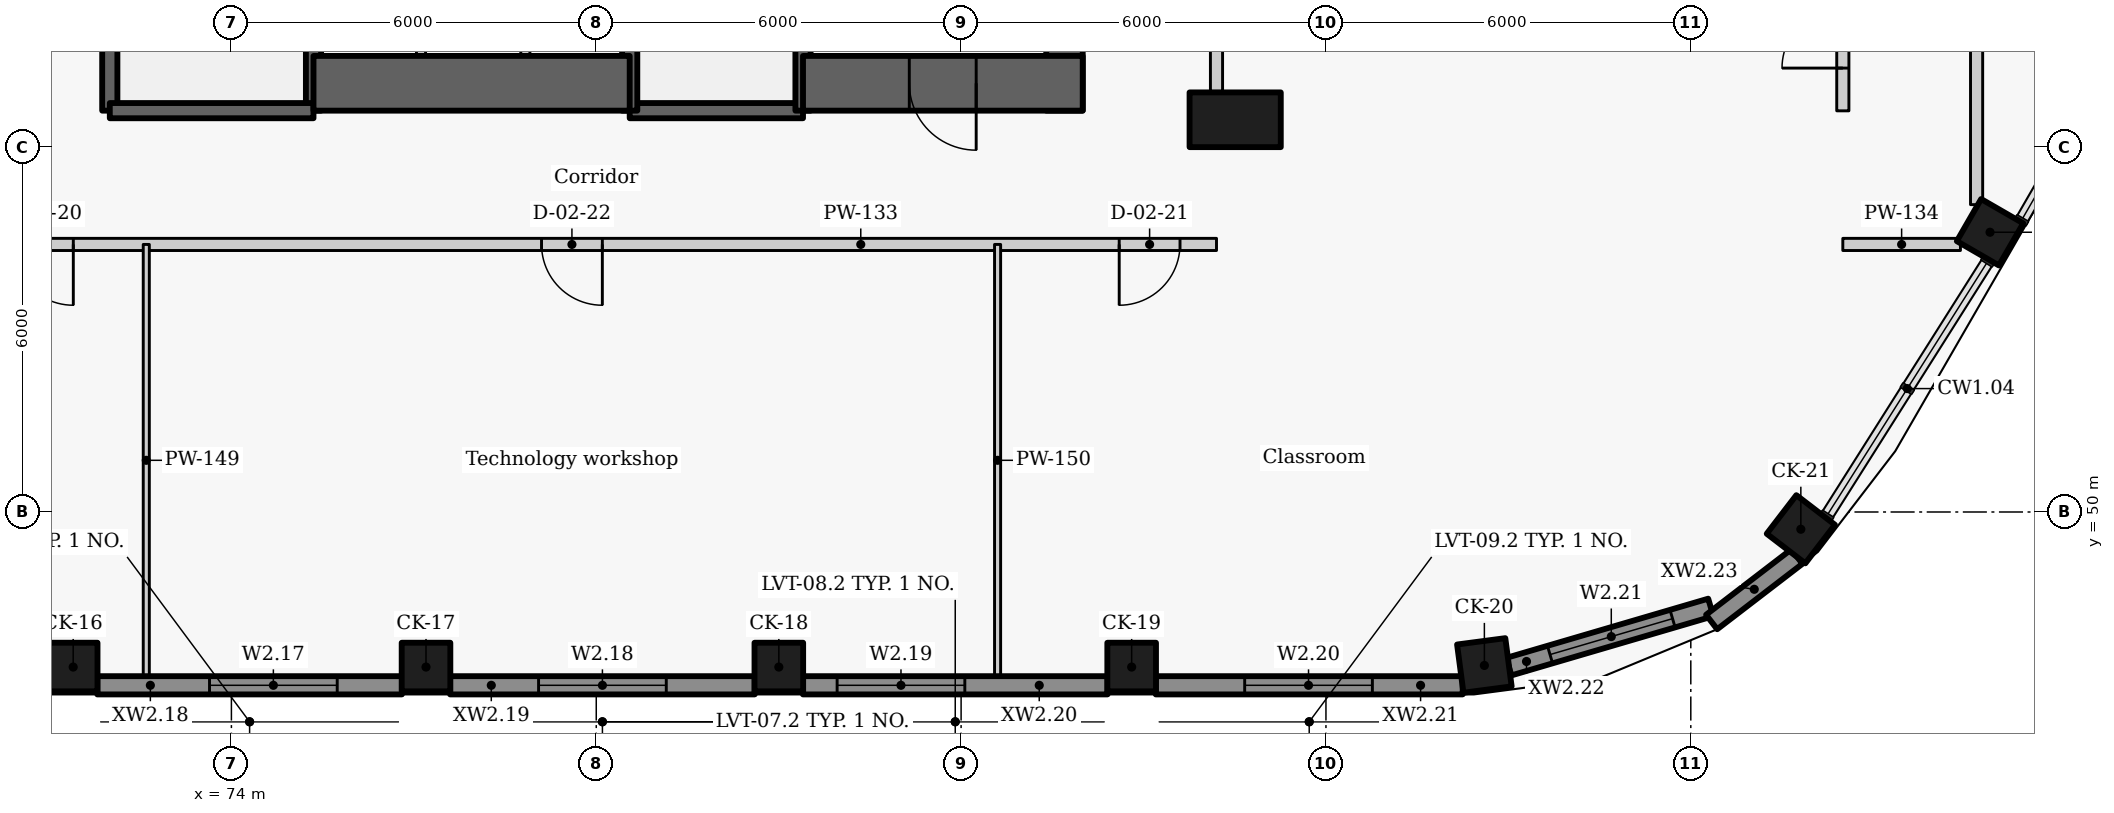
"""IFC4 building model, lengths in metres.
Left out: names, types, materials, properties, quantities, classifications, styles, units other than length and angle.
Written with IfcOpenShell. Run it as: python <this file> out.ifc"""

import sys

from ifc_helpers import new_model, si_unit, direction, frame, frame_2d, origin, origin_2d, place, context, subcontext, project, spatial, rectangle, extrude, element, fill, save


model = new_model("IFC4")
c1 = context("Model", 3, precision=1e-05, world=origin(), true_north=direction((0.0, 1.0)))
c2 = subcontext(c1, "Body", "Model", "MODEL_VIEW")
j1 = project(units=[si_unit("LENGTHUNIT", "METRE"), si_unit("PLANEANGLEUNIT", "RADIAN")], contexts=[c1])
p1 = place(None, origin())
s1 = spatial("IfcSite", under=j1, at=p1, CompositionType="ELEMENT")
p2 = place(p1, origin())
s2 = spatial("IfcBuilding", under=s1, at=p2, CompositionType="ELEMENT")
p3 = place(p2, frame((0.0, 0.0, 15.6)))
s3 = spatial("IfcBuildingStorey", under=s2, at=p3, CompositionType="ELEMENT", Elevation=15.6)
p4 = place(p3, frame((90.507, 56.45, 0.0), z_axis=(0.0, 0.0, 1.0), x_axis=(1.0, 0.0, 0.0)))
e1 = element("IfcColumn", 1, at=p4, inside=s3, PredefinedType="COLUMN", context=c2, shape_type="SweptSolid", body=[
    extrude(rectangle(XDim=1.5, YDim=0.9, at=origin_2d()), origin(), (0.0, 0.0, 1.0), 4.2),
])
for number, where, z_axis, x_axis in (
    (2, (71.398, 47.45, 0.0), (0.0, 0.0, 1.0), (1.0, 0.0, 0.0)),
    (3, (77.2, 47.45, 0.0), (0.0, 0.0, 1.0), (1.0, 0.0, 0.0)),
    (4, (83.002, 47.45, 0.0), (0.0, 0.0, 1.0), (1.0, 0.0, 0.0)),
    (5, (88.805, 47.45, 0.0), (0.0, 0.0, 1.0), (1.0, 0.0, 0.0)),
    (6, (94.605, 47.477, 0.0), (0.0, 0.0, 1.0), (0.991, 0.131, 0.0)),
    (7, (99.81, 49.716, 0.0), (0.0, 0.0, 1.0), (0.609, 0.793, 0.0)),
    (8, (102.921, 54.6, 0.0), (0.0, 0.0, 1.0), (0.5, 0.866, 0.0)),
):
    element("IfcColumn", number, at=place(p3, frame(where, z_axis=z_axis, x_axis=x_axis)), inside=s3, PredefinedType="COLUMN", context=c2, shape_type="SweptSolid", body=[
        extrude(rectangle(XDim=0.8, YDim=0.8, at=origin_2d()), origin(), (0.0, 0.0, 1.0), 4.2),
    ])
p5 = place(p3, frame((71.794, 47.15, 0.0), z_axis=(0.0, 0.0, 1.0), x_axis=(1.0, 0.0, 0.0)))
e9 = element("IfcWall", 9, at=p5, inside=s3, PredefinedType="SOLIDWALL", context=c2, shape_type="SweptSolid", body=[
    extrude(rectangle(XDim=5.01, YDim=0.3, at=frame_2d((2.505, 0.0))), origin(), (0.0, 0.0, 1.0), 3.0),
])
p6 = place(p5, frame((1.846, 0.0, 0.9)))
e10 = element("IfcOpeningElement", 10, at=p6, cuts=e9, PredefinedType="OPENING", context=c2, shape_type="SweptSolid", body=[
    extrude(rectangle(XDim=2.1, YDim=2.05, at=frame_2d((1.05, 1.025))), frame((0.0, 0.16, 0.0), z_axis=(0.0, -1.0, 0.0), x_axis=(1.0, 0.0, 0.0)), (0.0, 0.0, 1.0), 0.32),
])
p7 = place(p3, frame((77.596, 47.15, 0.0), z_axis=(0.0, 0.0, 1.0), x_axis=(1.0, 0.0, 0.0)))
e11 = element("IfcWall", 11, at=p7, inside=s3, PredefinedType="SOLIDWALL", context=c2, shape_type="SweptSolid", body=[
    extrude(rectangle(XDim=5.01, YDim=0.3, at=frame_2d((2.505, 0.0))), origin(), (0.0, 0.0, 1.0), 3.0),
])
p8 = place(p7, frame((1.455, 0.0, 0.9)))
e12 = element("IfcOpeningElement", 12, at=p8, cuts=e11, PredefinedType="OPENING", context=c2, shape_type="SweptSolid", body=[
    extrude(rectangle(XDim=2.1, YDim=2.05, at=frame_2d((1.05, 1.025))), frame((0.0, 0.16, 0.0), z_axis=(0.0, -1.0, 0.0), x_axis=(1.0, 0.0, 0.0)), (0.0, 0.0, 1.0), 0.32),
])
p9 = place(p3, frame((83.398, 47.15, 0.0), z_axis=(0.0, 0.0, 1.0), x_axis=(1.0, 0.0, 0.0)))
e13 = element("IfcWall", 13, at=p9, inside=s3, PredefinedType="SOLIDWALL", context=c2, shape_type="SweptSolid", body=[
    extrude(rectangle(XDim=5.01, YDim=0.3, at=frame_2d((2.505, 0.0))), origin(), (0.0, 0.0, 1.0), 3.0),
])
p10 = place(p9, frame((0.563, 0.0, 0.9)))
e14 = element("IfcOpeningElement", 14, at=p10, cuts=e13, PredefinedType="OPENING", context=c2, shape_type="SweptSolid", body=[
    extrude(rectangle(XDim=2.1, YDim=2.05, at=frame_2d((1.05, 1.025))), frame((0.0, 0.16, 0.0), z_axis=(0.0, -1.0, 0.0), x_axis=(1.0, 0.0, 0.0)), (0.0, 0.0, 1.0), 0.32),
])
p11 = place(p3, frame((89.201, 47.15, 0.0), z_axis=(0.0, 0.0, 1.0), x_axis=(1.0, 0.0, 0.0)))
e15 = element("IfcWall", 15, at=p11, inside=s3, PredefinedType="SOLIDWALL", context=c2, shape_type="SweptSolid", body=[
    extrude(rectangle(XDim=5.048, YDim=0.3, at=frame_2d((2.524, 0.0))), origin(), (0.0, 0.0, 1.0), 3.0),
])
p12 = place(p11, frame((1.463, 0.0, 0.9)))
e16 = element("IfcOpeningElement", 16, at=p12, cuts=e15, PredefinedType="OPENING", context=c2, shape_type="SweptSolid", body=[
    extrude(rectangle(XDim=2.1, YDim=2.05, at=frame_2d((1.05, 1.025))), frame((0.0, 0.16, 0.0), z_axis=(0.0, -1.0, 0.0), x_axis=(1.0, 0.0, 0.0)), (0.0, 0.0, 1.0), 0.32),
])
p13 = place(p3, frame((95.007, 47.457, 0.0), z_axis=(0.0, 0.0, 1.0), x_axis=(0.959578633815, 0.281440660756, 0.0)))
e17 = element("IfcWall", 17, at=p13, inside=s3, PredefinedType="SOLIDWALL", context=c2, shape_type="SweptSolid", body=[
    extrude(rectangle(XDim=3.461, YDim=0.3, at=frame_2d((1.73, 0.0))), origin(), (0.0, 0.0, 1.0), 3.0),
])
p14 = place(p13, frame((0.706, 0.0, 0.9)))
e18 = element("IfcOpeningElement", 18, at=p14, cuts=e17, PredefinedType="OPENING", context=c2, shape_type="SweptSolid", body=[
    extrude(rectangle(XDim=2.1, YDim=2.05, at=frame_2d((1.05, 1.025))), frame((0.0, 0.16, 0.0), z_axis=(0.0, -1.0, 0.0), x_axis=(1.0, 0.0, 0.0)), (0.0, 0.0, 1.0), 0.32),
])
p15 = place(p3, frame((98.343, 48.191, 0.0), z_axis=(0.0, 0.0, 1.0), x_axis=(0.793403972369, 0.608695438318, 0.0)))
e19 = element("IfcWall", 19, at=p15, inside=s3, PredefinedType="SOLIDWALL", context=c2, shape_type="SweptSolid", body=[
    extrude(rectangle(XDim=1.767, YDim=0.3, at=frame_2d((0.884, 0.0))), origin(), (0.0, 0.0, 1.0), 3.0),
])
p16 = place(p3, frame((87.7, 72.2, -0.3), z_axis=(0.0, 0.0, 1.0), x_axis=(0.0, -1.0, 0.0)))
e20 = element("IfcWall", 20, at=p16, inside=s3, PredefinedType="SHEAR", context=c2, shape_type="SweptSolid", body=[
    extrude(rectangle(XDim=15.6, YDim=0.6, at=frame_2d((7.8, 0.0))), origin(), (0.0, 0.0, 1.0), 4.2),
])
p17 = place(p16, frame((11.8, 0.0, 0.3)))
e21 = element("IfcOpeningElement", 21, at=p17, cuts=e20, PredefinedType="OPENING", context=c2, shape_type="SweptSolid", body=[
    extrude(rectangle(XDim=1.1, YDim=2.1, at=frame_2d((0.55, 1.05))), frame((0.0, 0.31, 0.0), z_axis=(0.0, -1.0, 0.0), x_axis=(1.0, 0.0, 0.0)), (0.0, 0.0, 1.0), 0.62),
])
p18 = place(p3, frame((75.35, 56.6, -0.3), z_axis=(0.0, 0.0, 1.0), x_axis=(0.0, 1.0, 0.0)))
e22 = element("IfcWall", 22, at=p18, inside=s3, PredefinedType="SHEAR", context=c2, shape_type="SweptSolid", body=[
    extrude(rectangle(XDim=5.003, YDim=0.25, at=frame_2d((2.501, 0.0))), origin(), (0.0, 0.0, 1.0), 4.2),
])
p19 = place(p3, frame((72.0, 56.6, -0.3), z_axis=(0.0, 0.0, 1.0), x_axis=(0.0, 1.0, 0.0)))
e23 = element("IfcWall", 23, at=p19, inside=s3, PredefinedType="SHEAR", context=c2, shape_type="SweptSolid", body=[
    extrude(rectangle(XDim=6.5, YDim=0.25, at=frame_2d((3.25, 0.0))), origin(), (0.0, 0.0, 1.0), 4.2),
])
p20 = place(p3, frame((72.0, 56.6, -0.3), z_axis=(0.0, 0.0, 1.0), x_axis=(1.0, 0.0, 0.0)))
e24 = element("IfcWall", 24, at=p20, inside=s3, PredefinedType="SHEAR", context=c2, shape_type="SweptSolid", body=[
    extrude(rectangle(XDim=3.35, YDim=0.25, at=frame_2d((1.675, 0.0))), origin(), (0.0, 0.0, 1.0), 4.2),
])
p21 = place(p3, frame((80.55, 56.6, -0.3), z_axis=(0.0, 0.0, 1.0), x_axis=(1.0, 0.0, 0.0)))
e25 = element("IfcWall", 25, at=p21, inside=s3, PredefinedType="SHEAR", context=c2, shape_type="SweptSolid", body=[
    extrude(rectangle(XDim=2.85, YDim=0.25, at=frame_2d((1.425, 0.0))), origin(), (0.0, 0.0, 1.0), 4.2),
])
p22 = place(p3, frame((83.4, 63.1, -0.3), z_axis=(0.0, 0.0, 1.0), x_axis=(0.0, -1.0, 0.0)))
e26 = element("IfcWall", 26, at=p22, inside=s3, PredefinedType="SHEAR", context=c2, shape_type="SweptSolid", body=[
    extrude(rectangle(XDim=6.5, YDim=0.25, at=frame_2d((3.25, 0.0))), origin(), (0.0, 0.0, 1.0), 4.2),
])
p23 = place(p22, frame((0.25, 0.0, 0.3)))
e27 = element("IfcOpeningElement", 27, at=p23, cuts=e26, PredefinedType="OPENING", context=c2, shape_type="SweptSolid", body=[
    extrude(rectangle(XDim=0.9, YDim=2.1, at=frame_2d((0.45, 1.05))), frame((0.0, 0.135, 0.0), z_axis=(0.0, -1.0, 0.0), x_axis=(1.0, 0.0, 0.0)), (0.0, 0.0, 1.0), 0.27),
])
p24 = place(p3, frame((80.55, 56.6, -0.3), z_axis=(0.0, 0.0, 1.0), x_axis=(0.0, 1.0, 0.0)))
e28 = element("IfcWall", 28, at=p24, inside=s3, PredefinedType="SHEAR", context=c2, shape_type="SweptSolid", body=[
    extrude(rectangle(XDim=5.003, YDim=0.25, at=frame_2d((2.501, 0.0))), origin(), (0.0, 0.0, 1.0), 4.2),
])
p25 = place(p3, frame((75.35, 57.05, -0.3), z_axis=(0.0, 0.0, 1.0), x_axis=(1.0, 0.0, 0.0)))
e29 = element("IfcWall", 29, at=p25, inside=s3, PredefinedType="SHEAR", context=c2, shape_type="SweptSolid", body=[
    extrude(rectangle(XDim=5.2, YDim=0.9, at=frame_2d((2.6, 0.0))), origin(), (0.0, 0.0, 1.0), 4.2),
])
p26 = place(p3, frame((88.0, 57.05, -0.3), z_axis=(0.0, 0.0, 1.0), x_axis=(-1.0, 0.0, 0.0)))
e30 = element("IfcWall", 30, at=p26, inside=s3, PredefinedType="SHEAR", context=c2, shape_type="SweptSolid", body=[
    extrude(rectangle(XDim=4.6, YDim=0.9, at=frame_2d((2.3, 0.0))), origin(), (0.0, 0.0, 1.0), 4.2),
])
p27 = place(p26, frame((1.752, 0.0, 0.3)))
e31 = element("IfcOpeningElement", 31, at=p27, cuts=e30, PredefinedType="OPENING", context=c2, shape_type="SweptSolid", body=[
    extrude(rectangle(XDim=1.1, YDim=2.1, at=frame_2d((0.55, 1.05))), frame((0.0, 0.46, 0.0), z_axis=(0.0, -1.0, 0.0), x_axis=(1.0, 0.0, 0.0)), (0.0, 0.0, 1.0), 0.92),
])
for number, where, z_axis, x_axis in (
    (32, (77.118, 56.6, 0.0), (0.0, 0.0, 1.0), (0.0, 1.0, 0.0)),
    (33, (78.834, 56.6, 0.0), (0.0, 0.0, 1.0), (0.0, 1.0, 0.0)),
):
    element("IfcWall", number, at=place(p3, frame(where, z_axis=z_axis, x_axis=x_axis)), inside=s3, PredefinedType="PARTITIONING", context=c2, shape_type="SweptSolid", body=[
        extrude(rectangle(XDim=5.0, YDim=0.15, at=frame_2d((2.5, 0.0))), origin(), (0.0, 0.0, 1.0), 3.9),
    ])
p28 = place(p3, frame((102.7, 61.553, 0.0), z_axis=(0.0, 0.0, 1.0), x_axis=(0.0, -1.0, 0.0)))
e34 = element("IfcWall", 34, at=p28, inside=s3, PredefinedType="PARTITIONING", context=c2, shape_type="SweptSolid", body=[
    extrude(rectangle(XDim=6.499, YDim=0.2, at=frame_2d((3.249, 0.0))), origin(), (0.0, 0.0, 1.0), 3.9),
])
p29 = place(p28, frame((2.75, 0.0, 0.0)))
e35 = element("IfcOpeningElement", 35, at=p29, cuts=e34, PredefinedType="OPENING", context=c2, shape_type="SweptSolid", body=[
    extrude(rectangle(XDim=1.0, YDim=2.1, at=frame_2d((0.5, 1.05))), frame((0.0, 0.11, 0.0), z_axis=(0.0, -1.0, 0.0), x_axis=(1.0, 0.0, 0.0)), (0.0, 0.0, 1.0), 0.22),
])
p30 = place(p3, frame((100.5, 56.597, 0.0), z_axis=(0.0, 0.0, 1.0), x_axis=(0.0, 1.0, 0.0)))
e36 = element("IfcWall", 36, at=p30, inside=s3, PredefinedType="PARTITIONING", context=c2, shape_type="SweptSolid", body=[
    extrude(rectangle(XDim=10.873, YDim=0.2, at=frame_2d((5.437, 0.0))), origin(), (0.0, 0.0, 1.0), 3.9),
])
p31 = place(p30, frame((5.003, 0.0, 0.0)))
e37 = element("IfcOpeningElement", 37, at=p31, cuts=e36, PredefinedType="OPENING", context=c2, shape_type="SweptSolid", body=[
    extrude(rectangle(XDim=1.0, YDim=2.1, at=frame_2d((0.5, 1.05))), frame((0.0, 0.11, 0.0), z_axis=(0.0, -1.0, 0.0), x_axis=(1.0, 0.0, 0.0)), (0.0, 0.0, 1.0), 0.22),
])
p32 = place(p30, frame((0.703, 0.0, 0.0)))
e38 = element("IfcOpeningElement", 38, at=p32, cuts=e36, PredefinedType="OPENING", context=c2, shape_type="SweptSolid", body=[
    extrude(rectangle(XDim=1.0, YDim=2.1, at=frame_2d((0.5, 1.05))), frame((0.0, 0.11, 0.0), z_axis=(0.0, -1.0, 0.0), x_axis=(1.0, 0.0, 0.0)), (0.0, 0.0, 1.0), 0.22),
])
p33 = place(p3, frame((90.2, 56.917, 0.0), z_axis=(0.0, 0.0, 1.0), x_axis=(0.0, 1.0, 0.0)))
e39 = element("IfcWall", 39, at=p33, inside=s3, PredefinedType="PARTITIONING", context=c2, shape_type="SweptSolid", body=[
    extrude(rectangle(XDim=1.516, YDim=0.2, at=frame_2d((0.758, 0.0))), origin(), (0.0, 0.0, 1.0), 3.9),
])
p34 = place(p3, frame((90.2, 54.4, 0.0), z_axis=(0.0, 0.0, 1.0), x_axis=(-1.0, 0.0, 0.0)))
e40 = element("IfcWall", 40, at=p34, inside=s3, PredefinedType="PARTITIONING", context=c2, shape_type="SweptSolid", body=[
    extrude(rectangle(XDim=20.4, YDim=0.2, at=frame_2d((10.2, 0.0))), origin(), (0.0, 0.0, 1.0), 3.9),
])
p35 = place(p34, frame((18.8, 0.0, 0.0)))
e41 = element("IfcOpeningElement", 41, at=p35, cuts=e40, PredefinedType="OPENING", context=c2, shape_type="SweptSolid", body=[
    extrude(rectangle(XDim=1.0, YDim=2.1, at=frame_2d((0.5, 1.05))), frame((0.0, 0.11, 0.0), z_axis=(0.0, -1.0, 0.0), x_axis=(1.0, 0.0, 0.0)), (0.0, 0.0, 1.0), 0.22),
])
p36 = place(p34, frame((0.6, 0.0, 0.0)))
e42 = element("IfcOpeningElement", 42, at=p36, cuts=e40, PredefinedType="OPENING", context=c2, shape_type="SweptSolid", body=[
    extrude(rectangle(XDim=1.0, YDim=2.1, at=frame_2d((0.5, 1.05))), frame((0.0, 0.11, 0.0), z_axis=(0.0, -1.0, 0.0), x_axis=(1.0, 0.0, 0.0)), (0.0, 0.0, 1.0), 0.22),
])
p37 = place(p34, frame((10.1, 0.0, 0.0)))
e43 = element("IfcOpeningElement", 43, at=p37, cuts=e40, PredefinedType="OPENING", context=c2, shape_type="SweptSolid", body=[
    extrude(rectangle(XDim=1.0, YDim=2.1, at=frame_2d((0.5, 1.05))), frame((0.0, 0.11, 0.0), z_axis=(0.0, -1.0, 0.0), x_axis=(1.0, 0.0, 0.0)), (0.0, 0.0, 1.0), 0.22),
])
p38 = place(p3, frame((100.5, 54.4, 0.0), z_axis=(0.0, 0.0, 1.0), x_axis=(1.0, 0.0, 0.0)))
e44 = element("IfcWall", 44, at=p38, inside=s3, PredefinedType="PARTITIONING", context=c2, shape_type="SweptSolid", body=[
    extrude(rectangle(XDim=1.934, YDim=0.2, at=frame_2d((0.967, 0.0))), origin(), (0.0, 0.0, 1.0), 3.9),
])
for number, where, z_axis, x_axis in (
    (45, (72.6, 47.3, 0.0), (0.0, 0.0, 1.0), (0.0, 1.0, 0.0)),
    (46, (86.6, 47.3, 0.0), (0.0, 0.0, 1.0), (0.0, 1.0, 0.0)),
):
    element("IfcWall", number, at=place(p3, frame(where, z_axis=z_axis, x_axis=x_axis)), inside=s3, PredefinedType="PARTITIONING", context=c2, shape_type="SweptSolid", body=[
        extrude(rectangle(XDim=7.1, YDim=0.1, at=frame_2d((3.55, 0.0))), origin(), (0.0, 0.0, 1.0), 3.13),
    ])
p39 = place(p6, origin())
e47 = element("IfcWindow", 47, at=p39, inside=s3, PartitioningType="SINGLE_PANEL", PredefinedType="WINDOW", context=c2, shape_type="SweptSolid", body=[
    extrude(rectangle(XDim=2.1, YDim=2.05, at=frame_2d((1.05, 1.025))), frame((0.0, 0.03, 0.0), z_axis=(0.0, -1.0, 0.0), x_axis=(1.0, 0.0, 0.0)), (0.0, 0.0, 1.0), 0.06),
])
fill(e10, e47)
p40 = place(p8, origin())
e48 = element("IfcWindow", 48, at=p40, inside=s3, PartitioningType="SINGLE_PANEL", PredefinedType="WINDOW", context=c2, shape_type="SweptSolid", body=[
    extrude(rectangle(XDim=2.1, YDim=2.05, at=frame_2d((1.05, 1.025))), frame((0.0, 0.03, 0.0), z_axis=(0.0, -1.0, 0.0), x_axis=(1.0, 0.0, 0.0)), (0.0, 0.0, 1.0), 0.06),
])
fill(e12, e48)
p41 = place(p10, origin())
e49 = element("IfcWindow", 49, at=p41, inside=s3, PartitioningType="SINGLE_PANEL", PredefinedType="WINDOW", context=c2, shape_type="SweptSolid", body=[
    extrude(rectangle(XDim=2.1, YDim=2.05, at=frame_2d((1.05, 1.025))), frame((0.0, 0.03, 0.0), z_axis=(0.0, -1.0, 0.0), x_axis=(1.0, 0.0, 0.0)), (0.0, 0.0, 1.0), 0.06),
])
fill(e14, e49)
p42 = place(p12, origin())
e50 = element("IfcWindow", 50, at=p42, inside=s3, PartitioningType="SINGLE_PANEL", PredefinedType="WINDOW", context=c2, shape_type="SweptSolid", body=[
    extrude(rectangle(XDim=2.1, YDim=2.05, at=frame_2d((1.05, 1.025))), frame((0.0, 0.03, 0.0), z_axis=(0.0, -1.0, 0.0), x_axis=(1.0, 0.0, 0.0)), (0.0, 0.0, 1.0), 0.06),
])
fill(e16, e50)
p43 = place(p14, origin())
e51 = element("IfcWindow", 51, at=p43, inside=s3, PartitioningType="SINGLE_PANEL", PredefinedType="WINDOW", context=c2, shape_type="SweptSolid", body=[
    extrude(rectangle(XDim=2.1, YDim=2.05, at=frame_2d((1.05, 1.025))), frame((0.0, 0.03, 0.0), z_axis=(0.0, -1.0, 0.0), x_axis=(1.0, 0.0, 0.0)), (0.0, 0.0, 1.0), 0.06),
])
fill(e18, e51)
p44 = place(p32, origin())
e52 = element("IfcDoor", 52, at=p44, inside=s3, OperationType="SINGLE_SWING_LEFT", PredefinedType="DOOR", context=c2, shape_type="SweptSolid", body=[
    extrude(rectangle(XDim=1.0, YDim=2.1, at=frame_2d((0.5, 1.05))), frame((0.0, 0.025, 0.0), z_axis=(0.0, -1.0, 0.0), x_axis=(1.0, 0.0, 0.0)), (0.0, 0.0, 1.0), 0.05),
])
fill(e38, e52)
p45 = place(p35, origin())
e53 = element("IfcDoor", 53, at=p45, inside=s3, OperationType="SINGLE_SWING_LEFT", PredefinedType="DOOR", context=c2, shape_type="SweptSolid", body=[
    extrude(rectangle(XDim=1.0, YDim=2.1, at=frame_2d((0.5, 1.05))), frame((0.0, 0.025, 0.0), z_axis=(0.0, -1.0, 0.0), x_axis=(1.0, 0.0, 0.0)), (0.0, 0.0, 1.0), 0.05),
])
fill(e41, e53)
p46 = place(p36, origin())
e54 = element("IfcDoor", 54, at=p46, inside=s3, OperationType="SINGLE_SWING_RIGHT", PredefinedType="DOOR", context=c2, shape_type="SweptSolid", body=[
    extrude(rectangle(XDim=1.0, YDim=2.1, at=frame_2d((0.5, 1.05))), frame((0.0, 0.025, 0.0), z_axis=(0.0, -1.0, 0.0), x_axis=(1.0, 0.0, 0.0)), (0.0, 0.0, 1.0), 0.05),
])
fill(e42, e54)
p47 = place(p37, origin())
e55 = element("IfcDoor", 55, at=p47, inside=s3, OperationType="SINGLE_SWING_LEFT", PredefinedType="DOOR", context=c2, shape_type="SweptSolid", body=[
    extrude(rectangle(XDim=1.0, YDim=2.1, at=frame_2d((0.5, 1.05))), frame((0.0, 0.025, 0.0), z_axis=(0.0, -1.0, 0.0), x_axis=(1.0, 0.0, 0.0)), (0.0, 0.0, 1.0), 0.05),
])
fill(e43, e55)
p48 = place(p27, origin())
e56 = element("IfcDoor", 56, at=p48, inside=s3, OperationType="SINGLE_SWING_LEFT", PredefinedType="DOOR", context=c2, shape_type="SweptSolid", body=[
    extrude(rectangle(XDim=1.1, YDim=2.1, at=frame_2d((0.55, 1.05))), frame((0.0, 0.025, 0.0), z_axis=(0.0, -1.0, 0.0), x_axis=(1.0, 0.0, 0.0)), (0.0, 0.0, 1.0), 0.05),
])
fill(e31, e56)
save(model, sys.argv[1])
